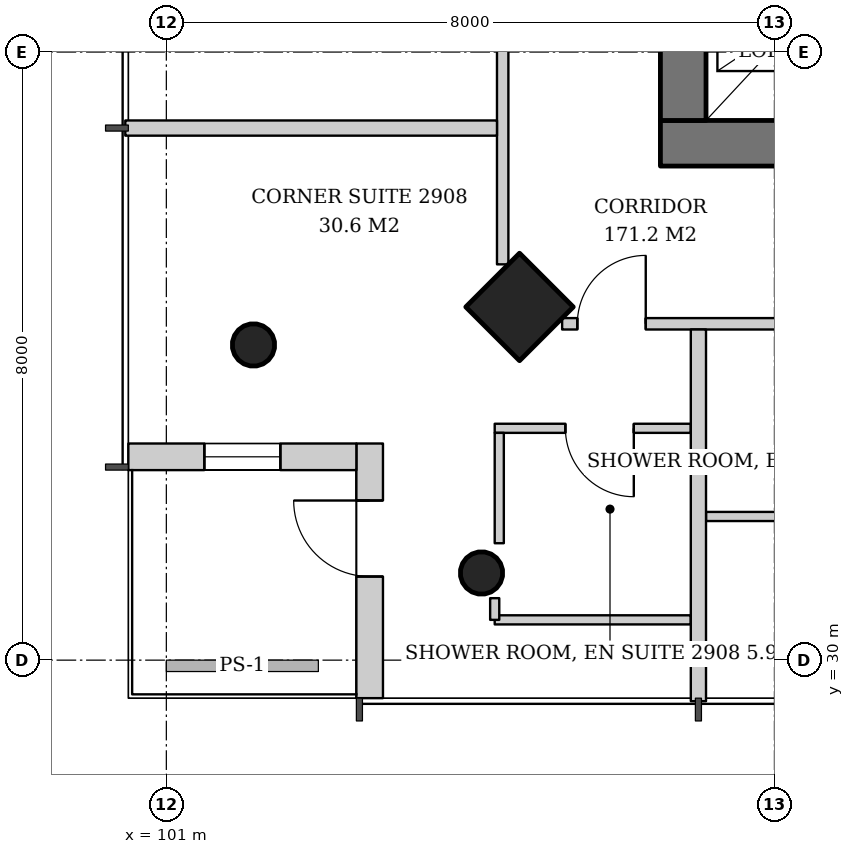
"""IFC4 building model, lengths in metres.
Left out: names, types, materials, properties, quantities, classifications, styles, units other than length and angle.
Written with IfcOpenShell. Run it as: python <this file> out.ifc"""

import sys

from ifc_helpers import new_model, si_unit, direction, frame, frame_2d, origin, origin_2d, place, context, subcontext, project, spatial, rectangle, hollow_circle, extrude, element, fill, save


model = new_model("IFC4")
c1 = context("Model", 3, precision=1e-05, world=origin(), true_north=direction((0.0, 1.0)))
c2 = subcontext(c1, "Body", "Model", "MODEL_VIEW")
j1 = project(units=[si_unit("LENGTHUNIT", "METRE"), si_unit("PLANEANGLEUNIT", "RADIAN")], contexts=[c1])
p1 = place(None, origin())
s1 = spatial("IfcSite", under=j1, at=p1, CompositionType="ELEMENT")
p2 = place(p1, origin())
s2 = spatial("IfcBuilding", under=s1, at=p2, CompositionType="ELEMENT")
p3 = place(p2, frame((0.0, 0.0, 116.0)))
s3 = spatial("IfcBuildingStorey", under=s2, at=p3, CompositionType="ELEMENT", Elevation=116.0)
p4 = place(p3, frame((105.595, 34.595, 0.0), z_axis=(0.043029647111, 0.043029647111, 0.998146732169), x_axis=(-0.707106781187, 0.707106781187, 0.0)))
e1 = element("IfcColumn", 1, at=p4, inside=s3, PredefinedType="COLUMN", context=c2, shape_type="SweptSolid", body=[
    extrude(rectangle(XDim=1.0, YDim=1.0, at=origin_2d()), origin(), (0.0, 0.0, 1.0), 3.807),
])
for number, where, z_axis, x_axis in (
    (2, (102.095, 34.095, 0.0), (0.043, 0.043, 0.998), (-0.707, 0.707, 0.0)),
    (3, (105.095, 31.095, 0.0), (0.043, 0.043, 0.998), (-0.707, 0.707, 0.0)),
):
    element("IfcColumn", number, at=place(p3, frame(where, z_axis=z_axis, x_axis=x_axis)), inside=s3, PredefinedType="COLUMN", context=c2, shape_type="SweptSolid", body=[
        extrude(hollow_circle(Radius=0.28, WallThickness=0.02, at=origin_2d()), origin(), (0.0, 0.0, 1.0), 3.807),
    ])
p5 = place(p3, frame((107.5, 36.8, 0.0), z_axis=(0.0, 0.0, 1.0), x_axis=(1.0, 0.0, 0.0)))
e4 = element("IfcWall", 4, at=p5, inside=s3, PredefinedType="SHEAR", context=c2, shape_type="SweptSolid", body=[
    extrude(rectangle(XDim=19.0, YDim=0.6, at=frame_2d((9.5, 0.0))), origin(), (0.0, 0.0, 1.0), 3.8),
])
p6 = place(p5, frame((3.9, 0.0, 0.0)))
e5 = element("IfcOpeningElement", 5, at=p6, cuts=e4, PredefinedType="OPENING", context=c2, shape_type="SweptSolid", body=[
    extrude(rectangle(XDim=1.0, YDim=2.1, at=frame_2d((0.5, 1.05))), frame((0.0, 0.31, 0.0), z_axis=(0.0, -1.0, 0.0), x_axis=(1.0, 0.0, 0.0)), (0.0, 0.0, 1.0), 0.62),
])
p7 = place(p5, frame((14.08, 0.0, 0.0)))
e6 = element("IfcOpeningElement", 6, at=p7, cuts=e4, PredefinedType="OPENING", context=c2, shape_type="SweptSolid", body=[
    extrude(rectangle(XDim=1.0, YDim=2.1, at=frame_2d((0.5, 1.05))), frame((0.0, 0.31, 0.0), z_axis=(0.0, -1.0, 0.0), x_axis=(1.0, 0.0, 0.0)), (0.0, 0.0, 1.0), 0.62),
])
p8 = place(p5, frame((15.542, 0.0, 0.0)))
e7 = element("IfcOpeningElement", 7, at=p8, cuts=e4, PredefinedType="OPENING", context=c2, shape_type="SweptSolid", body=[
    extrude(rectangle(XDim=1.0, YDim=2.1, at=frame_2d((0.5, 1.05))), frame((0.0, 0.31, 0.0), z_axis=(0.0, -1.0, 0.0), x_axis=(1.0, 0.0, 0.0)), (0.0, 0.0, 1.0), 0.62),
])
p9 = place(p5, frame((17.005, 0.0, 0.0)))
e8 = element("IfcOpeningElement", 8, at=p9, cuts=e4, PredefinedType="OPENING", context=c2, shape_type="SweptSolid", body=[
    extrude(rectangle(XDim=1.0, YDim=2.1, at=frame_2d((0.5, 1.05))), frame((0.0, 0.31, 0.0), z_axis=(0.0, -1.0, 0.0), x_axis=(1.0, 0.0, 0.0)), (0.0, 0.0, 1.0), 0.62),
])
p10 = place(p3, frame((107.8, 37.1, 0.0), z_axis=(0.0, 0.0, 1.0), x_axis=(0.0, 1.0, 0.0)))
e9 = element("IfcWall", 9, at=p10, inside=s3, PredefinedType="SHEAR", context=c2, shape_type="SweptSolid", body=[
    extrude(rectangle(XDim=17.8, YDim=0.6, at=frame_2d((8.9, 0.0))), origin(), (0.0, 0.0, 1.0), 3.8),
])
p11 = place(p10, frame((8.0, 0.0, 0.0)))
e10 = element("IfcOpeningElement", 10, at=p11, cuts=e9, PredefinedType="OPENING", context=c2, shape_type="SweptSolid", body=[
    extrude(rectangle(XDim=1.8, YDim=2.4, at=frame_2d((0.9, 1.2))), frame((0.0, 0.31, 0.0), z_axis=(0.0, -1.0, 0.0), x_axis=(1.0, 0.0, 0.0)), (0.0, 0.0, 1.0), 0.62),
])
p12 = place(p3, frame((103.675, 29.5, 0.0), z_axis=(0.0, 0.0, 1.0), x_axis=(0.0, 1.0, 0.0)))
e11 = element("IfcWall", 11, at=p12, inside=s3, PredefinedType="SOLIDWALL", context=c2, shape_type="SweptSolid", body=[
    extrude(rectangle(XDim=3.35, YDim=0.35, at=frame_2d((1.675, 0.0))), origin(), (0.0, 0.0, 1.0), 3.6),
])
p13 = place(p12, frame((1.6, 0.0, 0.0)))
e12 = element("IfcOpeningElement", 12, at=p13, cuts=e11, PredefinedType="OPENING", context=c2, shape_type="SweptSolid", body=[
    extrude(rectangle(XDim=1.0, YDim=2.4, at=frame_2d((0.5, 1.2))), frame((0.0, 0.185, 0.0), z_axis=(0.0, -1.0, 0.0), x_axis=(1.0, 0.0, 0.0)), (0.0, 0.0, 1.0), 0.37),
])
p14 = place(p3, frame((103.5, 32.675, 0.0), z_axis=(0.0, 0.0, 1.0), x_axis=(-1.0, 0.0, 0.0)))
e13 = element("IfcWall", 13, at=p14, inside=s3, PredefinedType="SOLIDWALL", context=c2, shape_type="SweptSolid", body=[
    extrude(rectangle(XDim=3.0, YDim=0.35, at=frame_2d((1.5, 0.0))), origin(), (0.0, 0.0, 1.0), 3.6),
])
p15 = place(p14, frame((1.0, 0.0, 0.9)))
e14 = element("IfcOpeningElement", 14, at=p15, cuts=e13, PredefinedType="OPENING", context=c2, shape_type="SweptSolid", body=[
    extrude(rectangle(XDim=1.0, YDim=2.4, at=frame_2d((0.5, 1.2))), frame((0.0, 0.185, 0.0), z_axis=(0.0, -1.0, 0.0), x_axis=(1.0, 0.0, 0.0)), (0.0, 0.0, 1.0), 0.37),
])
p16 = place(p3, frame((105.425, 56.793, 0.0), z_axis=(0.0, 0.0, 1.0), x_axis=(0.0, -1.0, 0.0)))
e15 = element("IfcWall", 15, at=p16, inside=s3, PredefinedType="PARTITIONING", context=c2, shape_type="SweptSolid", body=[
    extrude(rectangle(XDim=21.586, YDim=0.15, at=frame_2d((10.793, 0.0))), origin(), (0.0, 0.0, 1.0), 2.9),
])
p17 = place(p16, frame((0.2, 0.0, 0.0)))
e16 = element("IfcOpeningElement", 16, at=p17, cuts=e15, PredefinedType="OPENING", context=c2, shape_type="SweptSolid", body=[
    extrude(rectangle(XDim=0.9, YDim=2.1, at=frame_2d((0.45, 1.05))), frame((0.0, 0.085, 0.0), z_axis=(0.0, -1.0, 0.0), x_axis=(1.0, 0.0, 0.0)), (0.0, 0.0, 1.0), 0.17),
])
p18 = place(p16, frame((4.543, 0.0, 0.0)))
e17 = element("IfcOpeningElement", 17, at=p18, cuts=e15, PredefinedType="OPENING", context=c2, shape_type="SweptSolid", body=[
    extrude(rectangle(XDim=0.9, YDim=2.1, at=frame_2d((0.45, 1.05))), frame((0.0, 0.085, 0.0), z_axis=(0.0, -1.0, 0.0), x_axis=(1.0, 0.0, 0.0)), (0.0, 0.0, 1.0), 0.17),
])
p19 = place(p16, frame((13.543, 0.0, 0.0)))
e18 = element("IfcOpeningElement", 18, at=p19, cuts=e15, PredefinedType="OPENING", context=c2, shape_type="SweptSolid", body=[
    extrude(rectangle(XDim=0.9, YDim=2.1, at=frame_2d((0.45, 1.05))), frame((0.0, 0.085, 0.0), z_axis=(0.0, -1.0, 0.0), x_axis=(1.0, 0.0, 0.0)), (0.0, 0.0, 1.0), 0.17),
])
p20 = place(p3, frame((105.35, 37.0, 0.0), z_axis=(0.0, 0.0, 1.0), x_axis=(-1.0, 0.0, 0.0)))
e19 = element("IfcWall", 19, at=p20, inside=s3, PredefinedType="PARTITIONING", context=c2, shape_type="SweptSolid", body=[
    extrude(rectangle(XDim=4.89, YDim=0.2, at=frame_2d((2.445, 0.0))), origin(), (0.0, 0.0, 1.0), 3.2),
])
p21 = place(p3, frame((107.9, 33.05, 0.0), z_axis=(0.0, 0.0, 1.0), x_axis=(-1.0, 0.0, 0.0)))
e20 = element("IfcWall", 20, at=p21, inside=s3, PredefinedType="PARTITIONING", context=c2, shape_type="SweptSolid", body=[
    extrude(rectangle(XDim=2.58, YDim=0.12, at=frame_2d((1.29, 0.0))), origin(), (0.0, 0.0, 1.0), 2.9),
])
p22 = place(p21, frame((0.75, 0.0, 0.0)))
e21 = element("IfcOpeningElement", 21, at=p22, cuts=e20, PredefinedType="OPENING", context=c2, shape_type="SweptSolid", body=[
    extrude(rectangle(XDim=0.9, YDim=2.1, at=frame_2d((0.45, 1.05))), frame((0.0, 0.07, 0.0), z_axis=(0.0, -1.0, 0.0), x_axis=(1.0, 0.0, 0.0)), (0.0, 0.0, 1.0), 0.14),
])
p23 = place(p3, frame((107.9, 30.53, 0.0), z_axis=(0.0, 0.0, 1.0), x_axis=(-1.0, 0.0, 0.0)))
e22 = element("IfcWall", 22, at=p23, inside=s3, PredefinedType="PARTITIONING", context=c2, shape_type="SweptSolid", body=[
    extrude(rectangle(XDim=2.58, YDim=0.12, at=frame_2d((1.29, 0.0))), origin(), (0.0, 0.0, 1.0), 3.6),
])
p24 = place(p3, frame((105.38, 32.99, 0.0), z_axis=(0.0, 0.0, 1.0), x_axis=(0.0, -1.0, 0.0)))
e23 = element("IfcWall", 23, at=p24, inside=s3, PredefinedType="PARTITIONING", context=c2, shape_type="SweptSolid", body=[
    extrude(rectangle(XDim=1.452, YDim=0.12, at=frame_2d((0.726, 0.0))), origin(), (0.0, 0.0, 1.0), 3.2),
])
p25 = place(p3, frame((108.1, 31.89, 0.0), z_axis=(0.0, 0.0, 1.0), x_axis=(1.0, 0.0, 0.0)))
e24 = element("IfcWall", 24, at=p25, inside=s3, PredefinedType="PARTITIONING", context=c2, shape_type="SweptSolid", body=[
    extrude(rectangle(XDim=2.42, YDim=0.12, at=frame_2d((1.21, 0.0))), origin(), (0.0, 0.0, 1.0), 3.6),
])
p26 = place(p3, frame((106.207, 34.425, 0.0), z_axis=(0.0, 0.0, 1.0), x_axis=(1.0, 0.0, 0.0)))
e25 = element("IfcWall", 25, at=p26, inside=s3, PredefinedType="PARTITIONING", context=c2, shape_type="SweptSolid", body=[
    extrude(rectangle(XDim=21.586, YDim=0.15, at=frame_2d((10.793, 0.0))), origin(), (0.0, 0.0, 1.0), 2.9),
])
p27 = place(p26, frame((0.2, 0.0, 0.0)))
e26 = element("IfcOpeningElement", 26, at=p27, cuts=e25, PredefinedType="OPENING", context=c2, shape_type="SweptSolid", body=[
    extrude(rectangle(XDim=0.9, YDim=2.1, at=frame_2d((0.45, 1.05))), frame((0.0, 0.085, 0.0), z_axis=(0.0, -1.0, 0.0), x_axis=(1.0, 0.0, 0.0)), (0.0, 0.0, 1.0), 0.17),
])
p28 = place(p26, frame((4.543, 0.0, 0.0)))
e27 = element("IfcOpeningElement", 27, at=p28, cuts=e25, PredefinedType="OPENING", context=c2, shape_type="SweptSolid", body=[
    extrude(rectangle(XDim=0.9, YDim=2.1, at=frame_2d((0.45, 1.05))), frame((0.0, 0.085, 0.0), z_axis=(0.0, -1.0, 0.0), x_axis=(1.0, 0.0, 0.0)), (0.0, 0.0, 1.0), 0.17),
])
p29 = place(p26, frame((13.493, 0.0, 0.0)))
e28 = element("IfcOpeningElement", 28, at=p29, cuts=e25, PredefinedType="OPENING", context=c2, shape_type="SweptSolid", body=[
    extrude(rectangle(XDim=1.0, YDim=2.1, at=frame_2d((0.5, 1.05))), frame((0.0, 0.085, 0.0), z_axis=(0.0, -1.0, 0.0), x_axis=(1.0, 0.0, 0.0)), (0.0, 0.0, 1.0), 0.17),
])
p30 = place(p3, frame((108.0, 34.35, 0.0), z_axis=(0.0, 0.0, 1.0), x_axis=(0.0, -1.0, 0.0)))
e29 = element("IfcWall", 29, at=p30, inside=s3, PredefinedType="PARTITIONING", context=c2, shape_type="SweptSolid", body=[
    extrude(rectangle(XDim=4.89, YDim=0.2, at=frame_2d((2.445, 0.0))), origin(), (0.0, 0.0, 1.0), 2.9),
])
p31 = place(p3, frame((105.32, 30.53, 0.0), z_axis=(0.0, 0.0, 1.0), x_axis=(0.0, 1.0, 0.0)))
e30 = element("IfcWall", 30, at=p31, inside=s3, PredefinedType="PARTITIONING", context=c2, shape_type="SweptSolid", body=[
    extrude(rectangle(XDim=0.285, YDim=0.12, at=frame_2d((0.143, 0.0))), origin(), (0.0, 0.0, 1.0), 3.6),
])
p32 = place(p13, origin())
e31 = element("IfcDoor", 31, at=p32, inside=s3, OperationType="SINGLE_SWING_RIGHT", PredefinedType="DOOR", context=c2, shape_type="SweptSolid", body=[
    extrude(rectangle(XDim=1.0, YDim=2.4, at=frame_2d((0.5, 1.2))), frame((0.0, 0.025, 0.0), z_axis=(0.0, -1.0, 0.0), x_axis=(1.0, 0.0, 0.0)), (0.0, 0.0, 1.0), 0.05),
])
fill(e12, e31)
p33 = place(p15, origin())
e32 = element("IfcWindow", 32, at=p33, inside=s3, PartitioningType="SINGLE_PANEL", PredefinedType="WINDOW", context=c2, shape_type="SweptSolid", body=[
    extrude(rectangle(XDim=1.0, YDim=2.4, at=frame_2d((0.5, 1.2))), frame((0.0, 0.03, 0.0), z_axis=(0.0, -1.0, 0.0), x_axis=(1.0, 0.0, 0.0)), (0.0, 0.0, 1.0), 0.06),
])
fill(e14, e32)
p34 = place(p22, origin())
e33 = element("IfcDoor", 33, at=p34, inside=s3, OperationType="SINGLE_SWING_LEFT", PredefinedType="DOOR", context=c2, shape_type="SweptSolid", body=[
    extrude(rectangle(XDim=0.9, YDim=2.1, at=frame_2d((0.45, 1.05))), frame((0.0, 0.025, 0.0), z_axis=(0.0, -1.0, 0.0), x_axis=(1.0, 0.0, 0.0)), (0.0, 0.0, 1.0), 0.05),
])
fill(e21, e33)
p35 = place(p27, origin())
e34 = element("IfcDoor", 34, at=p35, inside=s3, OperationType="SINGLE_SWING_RIGHT", PredefinedType="DOOR", context=c2, shape_type="SweptSolid", body=[
    extrude(rectangle(XDim=0.9, YDim=2.1, at=frame_2d((0.45, 1.05))), frame((0.0, 0.025, 0.0), z_axis=(0.0, -1.0, 0.0), x_axis=(1.0, 0.0, 0.0)), (0.0, 0.0, 1.0), 0.05),
])
fill(e26, e34)
save(model, sys.argv[1])
